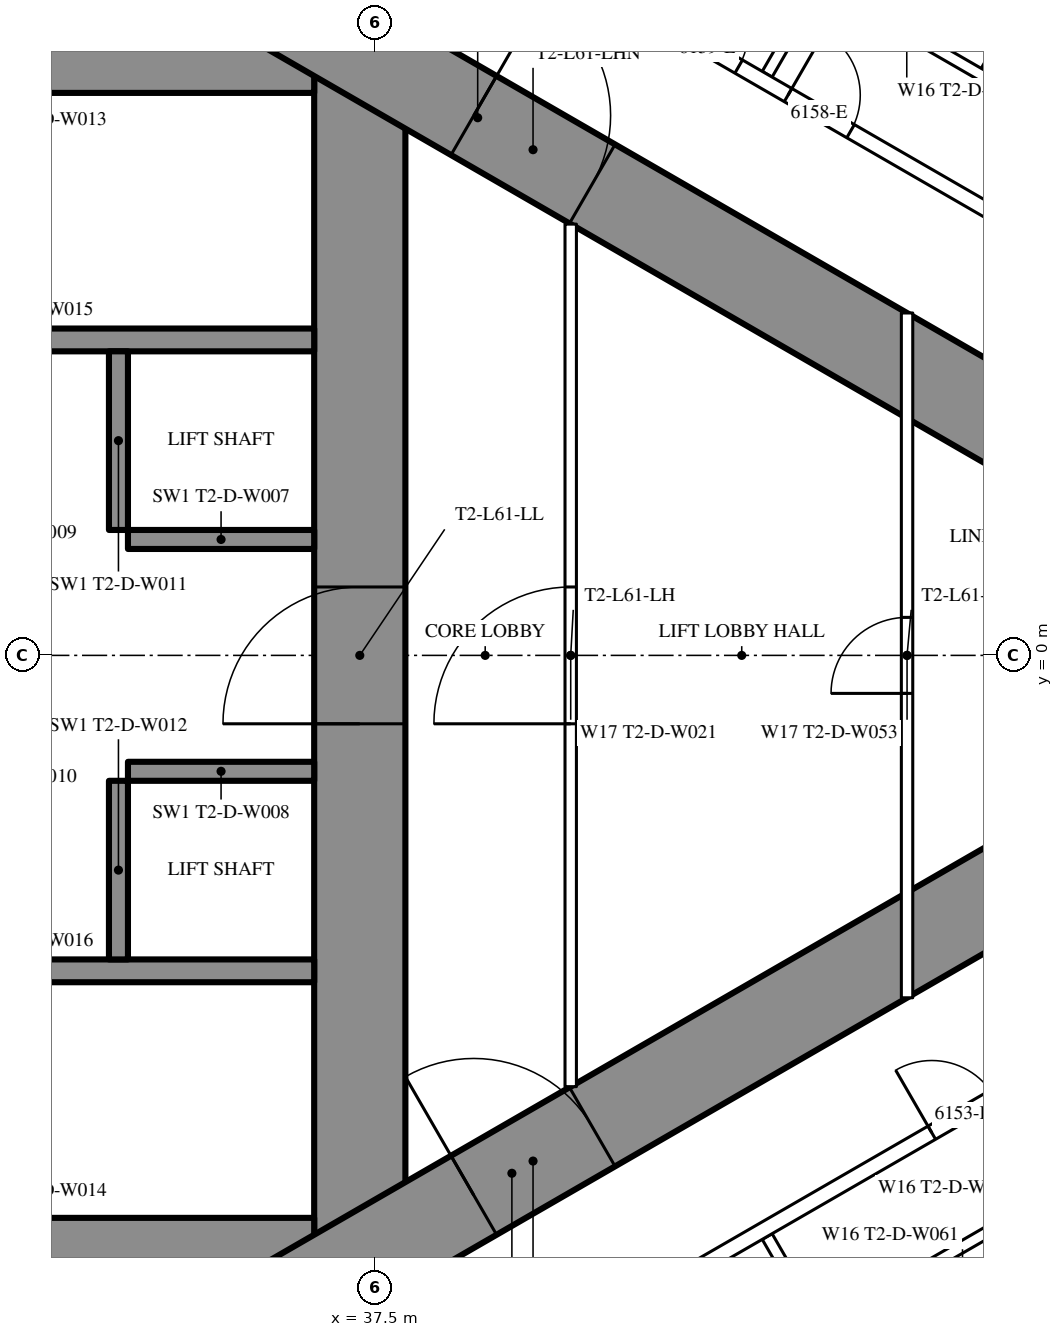
"""IFC4 building model, lengths in metres.
Left out: names, types, materials, properties, quantities, classifications, styles, units other than length and angle.
Written with IfcOpenShell. Run it as: python <this file> out.ifc"""

import sys

from ifc_helpers import new_model, si_unit, direction, frame, frame_2d, origin, place, context, subcontext, project, spatial, rectangle, extrude, element, fill, save


model = new_model("IFC4")
c1 = context("Model", 3, precision=1e-05, world=origin(), true_north=direction((0.0, 1.0)))
c2 = subcontext(c1, "Body", "Model", "MODEL_VIEW")
j1 = project(units=[si_unit("LENGTHUNIT", "METRE"), si_unit("PLANEANGLEUNIT", "RADIAN")], contexts=[c1])
p1 = place(None, origin())
s1 = spatial("IfcSite", under=j1, at=p1, CompositionType="ELEMENT")
p2 = place(p1, origin())
s2 = spatial("IfcBuilding", under=s1, at=p2, CompositionType="ELEMENT")
p3 = place(p2, frame((0.0, 0.0, 229.7)))
s3 = spatial("IfcBuildingStorey", under=s2, at=p3, CompositionType="ELEMENT", Elevation=229.7)
p4 = place(p3, frame((37.3, -8.6, 0.0), z_axis=(0.0, 0.0, 1.0), x_axis=(0.0, 1.0, 0.0)))
e1 = element("IfcWall", 1, at=p4, inside=s3, PredefinedType="SHEAR", context=c2, shape_type="SweptSolid", body=[
    extrude(rectangle(XDim=17.2, YDim=1.2, at=frame_2d((8.6, 0.0))), origin(), (0.0, 0.0, 1.0), 3.6),
])
p5 = place(p4, frame((7.7, 0.0, 0.0)))
e2 = element("IfcOpeningElement", 2, at=p5, cuts=e1, PredefinedType="OPENING", context=c2, shape_type="SweptSolid", body=[
    extrude(rectangle(XDim=1.8, YDim=2.2, at=frame_2d((0.9, 1.1))), frame((0.0, 0.61, 0.0), z_axis=(0.0, -1.0, 0.0), x_axis=(1.0, 0.0, 0.0)), (0.0, 0.0, 1.0), 1.22),
])
p6 = place(p3, frame((28.3, -8.0, 0.0), z_axis=(0.0, 0.0, 1.0), x_axis=(1.0, 0.0, 0.0)))
e3 = element("IfcWall", 3, at=p6, inside=s3, PredefinedType="SHEAR", context=c2, shape_type="SweptSolid", body=[
    extrude(rectangle(XDim=8.4, YDim=1.2, at=frame_2d((4.2, 0.0))), origin(), (0.0, 0.0, 1.0), 3.6),
])
p7 = place(p6, frame((0.25, 0.0, 0.0)))
e4 = element("IfcOpeningElement", 4, at=p7, cuts=e3, PredefinedType="OPENING", context=c2, shape_type="SweptSolid", body=[
    extrude(rectangle(XDim=1.0, YDim=2.2, at=frame_2d((0.5, 1.1))), frame((0.0, 0.61, 0.0), z_axis=(0.0, -1.0, 0.0), x_axis=(1.0, 0.0, 0.0)), (0.0, 0.0, 1.0), 1.22),
])
p8 = place(p3, frame((28.3, 8.0, 0.0), z_axis=(0.0, 0.0, 1.0), x_axis=(1.0, 0.0, 0.0)))
e5 = element("IfcWall", 5, at=p8, inside=s3, PredefinedType="SHEAR", context=c2, shape_type="SweptSolid", body=[
    extrude(rectangle(XDim=8.4, YDim=1.2, at=frame_2d((4.2, 0.0))), origin(), (0.0, 0.0, 1.0), 3.6),
])
p9 = place(p8, frame((0.25, 0.0, 0.0)))
e6 = element("IfcOpeningElement", 6, at=p9, cuts=e5, PredefinedType="OPENING", context=c2, shape_type="SweptSolid", body=[
    extrude(rectangle(XDim=1.0, YDim=2.2, at=frame_2d((0.5, 1.1))), frame((0.0, 0.61, 0.0), z_axis=(0.0, -1.0, 0.0), x_axis=(1.0, 0.0, 0.0)), (0.0, 0.0, 1.0), 1.22),
])
for number, where, z_axis, x_axis in (
    (7, (28.3, -4.15, 0.0), (0.0, 0.0, 1.0), (1.0, 0.0, 0.0)),
    (8, (28.3, 4.15, 0.0), (0.0, 0.0, 1.0), (1.0, 0.0, 0.0)),
):
    element("IfcWall", number, at=place(p3, frame(where, z_axis=z_axis, x_axis=x_axis)), inside=s3, PredefinedType="SHEAR", context=c2, shape_type="SweptSolid", body=[
        extrude(rectangle(XDim=8.4, YDim=0.3, at=frame_2d((4.2, 0.0))), origin(), (0.0, 0.0, 1.0), 3.6),
    ])
p10 = place(p3, frame((34.125, -4.0, 0.0), z_axis=(0.0, 0.0, 1.0), x_axis=(0.0, 1.0, 0.0)))
e9 = element("IfcWall", 9, at=p10, inside=s3, PredefinedType="SHEAR", context=c2, shape_type="SweptSolid", body=[
    extrude(rectangle(XDim=2.35, YDim=0.25, at=frame_2d((1.175, 0.0))), origin(), (0.0, 0.0, 1.0), 3.6),
])
p11 = place(p3, frame((34.25, -1.525, 0.0), z_axis=(0.0, 0.0, 1.0), x_axis=(1.0, 0.0, 0.0)))
e10 = element("IfcWall", 10, at=p11, inside=s3, PredefinedType="SHEAR", context=c2, shape_type="SweptSolid", body=[
    extrude(rectangle(XDim=2.45, YDim=0.25, at=frame_2d((1.225, 0.0))), origin(), (0.0, 0.0, 1.0), 3.6),
])
p12 = place(p3, frame((34.125, 1.65, 0.0), z_axis=(0.0, 0.0, 1.0), x_axis=(0.0, 1.0, 0.0)))
e11 = element("IfcWall", 11, at=p12, inside=s3, PredefinedType="SHEAR", context=c2, shape_type="SweptSolid", body=[
    extrude(rectangle(XDim=2.35, YDim=0.25, at=frame_2d((1.175, 0.0))), origin(), (0.0, 0.0, 1.0), 3.6),
])
p13 = place(p3, frame((34.25, 1.525, 0.0), z_axis=(0.0, 0.0, 1.0), x_axis=(1.0, 0.0, 0.0)))
e12 = element("IfcWall", 12, at=p13, inside=s3, PredefinedType="SHEAR", context=c2, shape_type="SweptSolid", body=[
    extrude(rectangle(XDim=2.45, YDim=0.25, at=frame_2d((1.225, 0.0))), origin(), (0.0, 0.0, 1.0), 3.6),
])
p14 = place(p3, frame((27.2, -13.8, 0.0), z_axis=(0.0, 0.0, 1.0), x_axis=(0.866027159892, 0.499996958321, 0.0)))
e13 = element("IfcWall", 13, at=p14, inside=s3, PredefinedType="SHEAR", context=c2, shape_type="SweptSolid", body=[
    extrude(rectangle(XDim=27.947, YDim=1.2, at=frame_2d((13.973, 0.0))), origin(), (0.0, 0.0, 1.0), 3.6),
])
p15 = place(p14, frame((4.6, 0.0, 0.0)))
e14 = element("IfcOpeningElement", 14, at=p15, cuts=e13, PredefinedType="OPENING", context=c2, shape_type="SweptSolid", body=[
    extrude(rectangle(XDim=1.0, YDim=2.2, at=frame_2d((0.5, 1.1))), frame((0.0, 0.61, 0.0), z_axis=(0.0, -1.0, 0.0), x_axis=(1.0, 0.0, 0.0)), (0.0, 0.0, 1.0), 1.22),
])
p16 = place(p14, frame((13.395, 0.0, 0.0)))
e15 = element("IfcOpeningElement", 15, at=p16, cuts=e13, PredefinedType="OPENING", context=c2, shape_type="SweptSolid", body=[
    extrude(rectangle(XDim=1.8, YDim=2.2, at=frame_2d((0.9, 1.1))), frame((0.0, 0.61, 0.0), z_axis=(0.0, -1.0, 0.0), x_axis=(1.0, 0.0, 0.0)), (0.0, 0.0, 1.0), 1.22),
])
p17 = place(p3, frame((27.2, 13.8, 0.0), z_axis=(0.0, 0.0, 1.0), x_axis=(0.866024515034, -0.500001539357, 0.0)))
e16 = element("IfcWall", 16, at=p17, inside=s3, PredefinedType="SHEAR", context=c2, shape_type="SweptSolid", body=[
    extrude(rectangle(XDim=26.907, YDim=1.2, at=frame_2d((13.454, 0.0))), origin(), (0.0, 0.0, 1.0), 3.6),
])
p18 = place(p17, frame((4.6, 0.0, 0.0)))
e17 = element("IfcOpeningElement", 17, at=p18, cuts=e16, PredefinedType="OPENING", context=c2, shape_type="SweptSolid", body=[
    extrude(rectangle(XDim=1.0, YDim=2.2, at=frame_2d((0.5, 1.1))), frame((0.0, 0.61, 0.0), z_axis=(0.0, -1.0, 0.0), x_axis=(1.0, 0.0, 0.0)), (0.0, 0.0, 1.0), 1.22),
])
p19 = place(p17, frame((13.395, 0.0, 0.0)))
e18 = element("IfcOpeningElement", 18, at=p19, cuts=e16, PredefinedType="OPENING", context=c2, shape_type="SweptSolid", body=[
    extrude(rectangle(XDim=1.8, YDim=2.2, at=frame_2d((0.9, 1.1))), frame((0.0, 0.61, 0.0), z_axis=(0.0, -1.0, 0.0), x_axis=(1.0, 0.0, 0.0)), (0.0, 0.0, 1.0), 1.22),
])
for number, where, z_axis, x_axis in (
    (19, (42.66, -7.646, 0.0), (0.0, 0.0, 1.0), (0.5, -0.866, 0.0)),
    (20, (42.66, 7.646, 0.0), (0.0, 0.0, 1.0), (0.5, 0.866, 0.0)),
):
    element("IfcWall", number, at=place(p3, frame(where, z_axis=z_axis, x_axis=x_axis)), inside=s3, PredefinedType="PARTITIONING", context=c2, shape_type="SweptSolid", body=[
        extrude(rectangle(XDim=6.398, YDim=0.15, at=frame_2d((3.199, 0.0))), origin(), (0.0, 0.0, 1.0), 2.45),
    ])
p20 = place(p3, frame((28.959, 15.44, 0.0), z_axis=(0.0, 0.0, 1.0), x_axis=(0.866028936079, -0.499993881836, 0.0)))
e21 = element("IfcWall", 21, at=p20, inside=s3, PredefinedType="PARTITIONING", context=c2, shape_type="SweptSolid", body=[
    extrude(rectangle(XDim=20.503, YDim=0.2, at=frame_2d((10.251, 0.0))), origin(), (0.0, 0.0, 1.0), 3.35),
])
p21 = place(p20, frame((16.137, 0.0, 0.0)))
e22 = element("IfcOpeningElement", 22, at=p21, cuts=e21, PredefinedType="OPENING", context=c2, shape_type="SweptSolid", body=[
    extrude(rectangle(XDim=0.95, YDim=2.2, at=frame_2d((0.475, 1.1))), frame((0.0, 0.11, 0.0), z_axis=(0.0, -1.0, 0.0), x_axis=(1.0, 0.0, 0.0)), (0.0, 0.0, 1.0), 0.22),
])
p22 = place(p20, frame((14.437, 0.0, 0.0)))
e23 = element("IfcOpeningElement", 23, at=p22, cuts=e21, PredefinedType="OPENING", context=c2, shape_type="SweptSolid", body=[
    extrude(rectangle(XDim=0.95, YDim=2.2, at=frame_2d((0.475, 1.1))), frame((0.0, 0.11, 0.0), z_axis=(0.0, -1.0, 0.0), x_axis=(1.0, 0.0, 0.0)), (0.0, 0.0, 1.0), 0.22),
])
p23 = place(p20, frame((2.244, 0.0, 0.0)))
e24 = element("IfcOpeningElement", 24, at=p23, cuts=e21, PredefinedType="OPENING", context=c2, shape_type="SweptSolid", body=[
    extrude(rectangle(XDim=1.8, YDim=2.04, at=frame_2d((0.9, 1.02))), frame((0.0, 0.11, 0.0), z_axis=(0.0, -1.0, 0.0), x_axis=(1.0, 0.0, 0.0)), (0.0, 0.0, 1.0), 0.22),
])
p24 = place(p3, frame((44.514, -8.191, 0.0), z_axis=(0.0, 0.0, 1.0), x_axis=(0.866031185235, 0.4999899861, 0.0)))
e25 = element("IfcWall", 25, at=p24, inside=s3, PredefinedType="PARTITIONING", context=c2, shape_type="SweptSolid", body=[
    extrude(rectangle(XDim=2.475, YDim=0.15, at=frame_2d((1.238, 0.0))), origin(), (0.0, 0.0, 1.0), 3.35),
])
p25 = place(p3, frame((45.503, 7.621, 0.0), z_axis=(0.0, 0.0, 1.0), x_axis=(0.500006934395, 0.866021400173, 0.0)))
e26 = element("IfcWall", 26, at=p25, inside=s3, PredefinedType="PARTITIONING", context=c2, shape_type="SweptSolid", body=[
    extrude(rectangle(XDim=2.6, YDim=0.15, at=frame_2d((1.3, 0.0))), origin(), (0.0, 0.0, 1.0), 3.35),
])
p26 = place(p25, frame((0.9, 0.0, 0.0)))
e27 = element("IfcOpeningElement", 27, at=p26, cuts=e26, PredefinedType="OPENING", context=c2, shape_type="SweptSolid", body=[
    extrude(rectangle(XDim=0.8, YDim=2.2, at=frame_2d((0.4, 1.1))), frame((0.0, 0.085, 0.0), z_axis=(0.0, -1.0, 0.0), x_axis=(1.0, 0.0, 0.0)), (0.0, 0.0, 1.0), 0.17),
])
p27 = place(p3, frame((43.425, 8.821, 0.0), z_axis=(0.0, 0.0, 1.0), x_axis=(0.866006523861, -0.500032699561, 0.0)))
e28 = element("IfcWall", 28, at=p27, inside=s3, PredefinedType="PARTITIONING", context=c2, shape_type="SweptSolid", body=[
    extrude(rectangle(XDim=2.475, YDim=0.15, at=frame_2d((1.237, 0.0))), origin(), (0.0, 0.0, 1.0), 2.5),
])
p28 = place(p3, frame((28.959, -15.44, 0.0), z_axis=(0.0, 0.0, 1.0), x_axis=(0.866025204199, 0.500000345692, 0.0)))
e29 = element("IfcWall", 29, at=p28, inside=s3, PredefinedType="PARTITIONING", context=c2, shape_type="SweptSolid", body=[
    extrude(rectangle(XDim=19.646, YDim=0.2, at=frame_2d((9.823, 0.0))), origin(), (0.0, 0.0, 1.0), 3.35),
])
p29 = place(p28, frame((1.494, 0.0, 0.0)))
e30 = element("IfcOpeningElement", 30, at=p29, cuts=e29, PredefinedType="OPENING", context=c2, shape_type="SweptSolid", body=[
    extrude(rectangle(XDim=1.8, YDim=2.04, at=frame_2d((0.9, 1.02))), frame((0.0, 0.11, 0.0), z_axis=(0.0, -1.0, 0.0), x_axis=(1.0, 0.0, 0.0)), (0.0, 0.0, 1.0), 0.22),
])
p30 = place(p28, frame((7.687, 0.0, 0.0)))
e31 = element("IfcOpeningElement", 31, at=p30, cuts=e29, PredefinedType="OPENING", context=c2, shape_type="SweptSolid", body=[
    extrude(rectangle(XDim=1.0, YDim=2.2, at=frame_2d((0.5, 1.1))), frame((0.0, 0.11, 0.0), z_axis=(0.0, -1.0, 0.0), x_axis=(1.0, 0.0, 0.0)), (0.0, 0.0, 1.0), 0.22),
])
p31 = place(p28, frame((18.321, 0.0, 0.0)))
e32 = element("IfcOpeningElement", 32, at=p31, cuts=e29, PredefinedType="OPENING", context=c2, shape_type="SweptSolid", body=[
    extrude(rectangle(XDim=0.95, YDim=2.2, at=frame_2d((0.475, 1.1))), frame((0.0, 0.11, 0.0), z_axis=(0.0, -1.0, 0.0), x_axis=(1.0, 0.0, 0.0)), (0.0, 0.0, 1.0), 0.22),
])
p32 = place(p3, frame((40.075, -5.674, 0.0), z_axis=(0.0, 0.0, 1.0), x_axis=(0.0, 1.0, 0.0)))
e33 = element("IfcWall", 33, at=p32, inside=s3, PredefinedType="PARTITIONING", context=c2, shape_type="SweptSolid", body=[
    extrude(rectangle(XDim=11.348, YDim=0.15, at=frame_2d((5.674, 0.0))), origin(), (0.0, 0.0, 1.0), 3.35),
])
p33 = place(p32, frame((4.774, 0.0, 0.0)))
e34 = element("IfcOpeningElement", 34, at=p33, cuts=e33, PredefinedType="OPENING", context=c2, shape_type="SweptSolid", body=[
    extrude(rectangle(XDim=1.8, YDim=2.2, at=frame_2d((0.9, 1.1))), frame((0.0, 0.085, 0.0), z_axis=(0.0, -1.0, 0.0), x_axis=(1.0, 0.0, 0.0)), (0.0, 0.0, 1.0), 0.17),
])
p34 = place(p3, frame((44.5, -4.505, 0.0), z_axis=(0.0, 0.0, 1.0), x_axis=(0.0, 1.0, 0.0)))
e35 = element("IfcWall", 35, at=p34, inside=s3, PredefinedType="PARTITIONING", context=c2, shape_type="SweptSolid", body=[
    extrude(rectangle(XDim=9.009, YDim=0.15, at=frame_2d((4.505, 0.0))), origin(), (0.0, 0.0, 1.0), 3.35),
])
p35 = place(p34, frame((4.005, 0.0, 0.0)))
e36 = element("IfcOpeningElement", 36, at=p35, cuts=e35, PredefinedType="OPENING", context=c2, shape_type="SweptSolid", body=[
    extrude(rectangle(XDim=1.0, YDim=2.2, at=frame_2d((0.5, 1.1))), frame((0.0, 0.085, 0.0), z_axis=(0.0, -1.0, 0.0), x_axis=(1.0, 0.0, 0.0)), (0.0, 0.0, 1.0), 0.17),
])
p36 = place(p31, origin())
e37 = element("IfcDoor", 37, at=p36, inside=s3, OperationType="SINGLE_SWING_LEFT", PredefinedType="DOOR", context=c2, shape_type="SweptSolid", body=[
    extrude(rectangle(XDim=0.95, YDim=2.2, at=frame_2d((0.475, 1.1))), frame((0.0, 0.025, 0.0), z_axis=(0.0, -1.0, 0.0), x_axis=(1.0, 0.0, 0.0)), (0.0, 0.0, 1.0), 0.05),
])
fill(e32, e37)
p37 = place(p21, origin())
e38 = element("IfcDoor", 38, at=p37, inside=s3, OperationType="SINGLE_SWING_LEFT", PredefinedType="DOOR", context=c2, shape_type="SweptSolid", body=[
    extrude(rectangle(XDim=0.95, YDim=2.2, at=frame_2d((0.475, 1.1))), frame((0.0, 0.025, 0.0), z_axis=(0.0, -1.0, 0.0), x_axis=(1.0, 0.0, 0.0)), (0.0, 0.0, 1.0), 0.05),
])
fill(e22, e38)
p38 = place(p22, origin())
e39 = element("IfcDoor", 39, at=p38, inside=s3, OperationType="SINGLE_SWING_LEFT", PredefinedType="DOOR", context=c2, shape_type="SweptSolid", body=[
    extrude(rectangle(XDim=0.95, YDim=2.2, at=frame_2d((0.475, 1.1))), frame((0.0, 0.025, 0.0), z_axis=(0.0, -1.0, 0.0), x_axis=(1.0, 0.0, 0.0)), (0.0, 0.0, 1.0), 0.05),
])
fill(e23, e39)
p39 = place(p33, origin())
e40 = element("IfcDoor", 40, at=p39, inside=s3, OperationType="DOUBLE_DOOR_SINGLE_SWING", PredefinedType="DOOR", context=c2, shape_type="SweptSolid", body=[
    extrude(rectangle(XDim=1.8, YDim=2.2, at=frame_2d((0.9, 1.1))), frame((0.0, 0.025, 0.0), z_axis=(0.0, -1.0, 0.0), x_axis=(1.0, 0.0, 0.0)), (0.0, 0.0, 1.0), 0.05),
])
fill(e34, e40)
p40 = place(p35, origin())
e41 = element("IfcDoor", 41, at=p40, inside=s3, OperationType="SINGLE_SWING_LEFT", PredefinedType="DOOR", context=c2, shape_type="SweptSolid", body=[
    extrude(rectangle(XDim=1.0, YDim=2.2, at=frame_2d((0.5, 1.1))), frame((0.0, 0.025, 0.0), z_axis=(0.0, -1.0, 0.0), x_axis=(1.0, 0.0, 0.0)), (0.0, 0.0, 1.0), 0.05),
])
fill(e36, e41)
p41 = place(p16, origin())
e42 = element("IfcDoor", 42, at=p41, inside=s3, OperationType="DOUBLE_DOOR_SINGLE_SWING", PredefinedType="DOOR", context=c2, shape_type="SweptSolid", body=[
    extrude(rectangle(XDim=1.8, YDim=2.2, at=frame_2d((0.9, 1.1))), frame((0.0, 0.025, 0.0), z_axis=(0.0, -1.0, 0.0), x_axis=(1.0, 0.0, 0.0)), (0.0, 0.0, 1.0), 0.05),
])
fill(e15, e42)
p42 = place(p19, origin())
e43 = element("IfcDoor", 43, at=p42, inside=s3, OperationType="DOUBLE_DOOR_SINGLE_SWING", PredefinedType="DOOR", context=c2, shape_type="SweptSolid", body=[
    extrude(rectangle(XDim=1.8, YDim=2.2, at=frame_2d((0.9, 1.1))), frame((0.0, 0.025, 0.0), z_axis=(0.0, -1.0, 0.0), x_axis=(1.0, 0.0, 0.0)), (0.0, 0.0, 1.0), 0.05),
])
fill(e18, e43)
p43 = place(p5, origin())
e44 = element("IfcDoor", 44, at=p43, inside=s3, OperationType="DOUBLE_DOOR_SINGLE_SWING", PredefinedType="DOOR", context=c2, shape_type="SweptSolid", body=[
    extrude(rectangle(XDim=1.8, YDim=2.2, at=frame_2d((0.9, 1.1))), frame((0.0, 0.025, 0.0), z_axis=(0.0, -1.0, 0.0), x_axis=(1.0, 0.0, 0.0)), (0.0, 0.0, 1.0), 0.05),
])
fill(e2, e44)
save(model, sys.argv[1])
